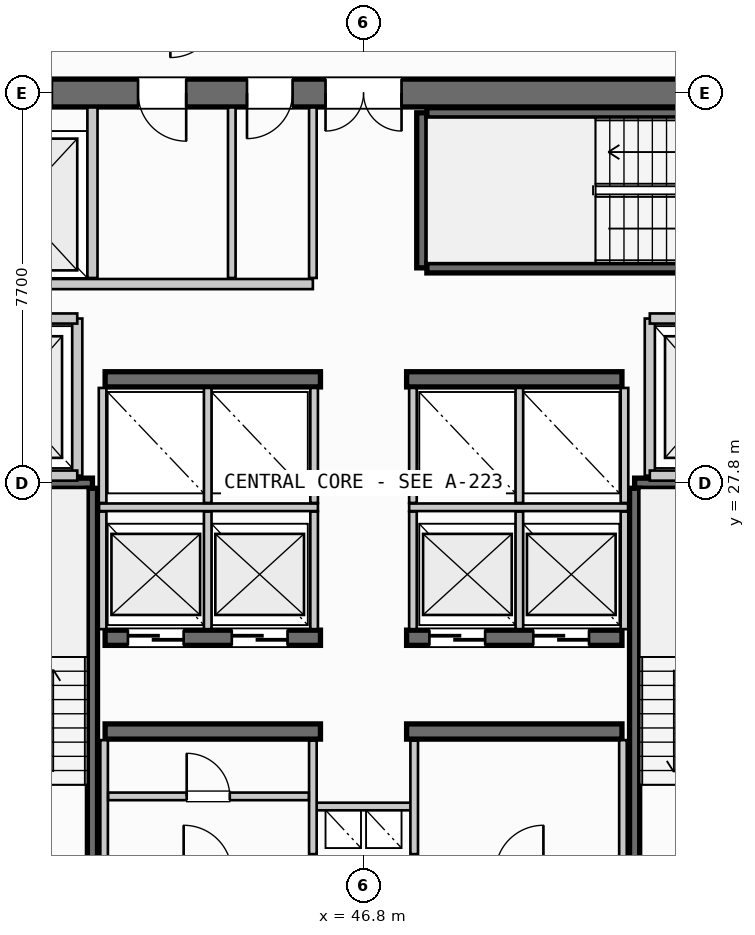
"""IFC4 building model, lengths in metres.
Left out: names, types, materials, properties, quantities, classifications, styles, units other than length and angle.
Written with IfcOpenShell. Run it as: python <this file> out.ifc"""

import sys

from ifc_helpers import new_model, si_unit, direction, frame, frame_2d, origin, place, context, subcontext, project, spatial, rectangle, extrude, source, transform, mapped, element, fill, save


model = new_model("IFC4")
c1 = context("Model", 3, precision=1e-05, world=origin(), true_north=direction((0.0, 1.0)))
c2 = subcontext(c1, "Body", "Model", "MODEL_VIEW")
j1 = project(units=[si_unit("LENGTHUNIT", "METRE"), si_unit("PLANEANGLEUNIT", "RADIAN")], contexts=[c1])
p1 = place(None, origin())
s1 = spatial("IfcSite", under=j1, at=p1, CompositionType="ELEMENT")
p2 = place(p1, origin())
s2 = spatial("IfcBuilding", under=s1, at=p2, CompositionType="ELEMENT")
p3 = place(p2, frame((0.0, 0.0, 164.3)))
s3 = spatial("IfcBuildingStorey", under=s2, at=p3, CompositionType="ELEMENT", Elevation=164.3)
p4 = place(p3, frame((55.6, 35.5, 0.0), z_axis=(0.0, 0.0, 1.0), x_axis=(-1.0, 0.0, 0.0)))
e1 = element("IfcWall", 1, at=p4, inside=s3, PredefinedType="SHEAR", context=c2, shape_type="SweptSolid", body=[
    extrude(rectangle(XDim=17.6, YDim=0.55, at=frame_2d((8.8, 0.0))), origin(), (0.0, 0.0, 1.0), 3.3),
])
p5 = place(p4, frame((8.05, 0.0, 0.0)))
e2 = element("IfcOpeningElement", 2, at=p5, cuts=e1, PredefinedType="OPENING", context=c2, shape_type="SweptSolid", body=[
    extrude(rectangle(XDim=1.5, YDim=2.2, at=frame_2d((0.75, 1.1))), frame((0.0, 0.285, 0.0), z_axis=(0.0, -1.0, 0.0), x_axis=(1.0, 0.0, 0.0)), (0.0, 0.0, 1.0), 0.57),
])
p6 = place(p4, frame((14.95, 0.0, 0.0)))
e3 = element("IfcOpeningElement", 3, at=p6, cuts=e1, PredefinedType="OPENING", context=c2, shape_type="SweptSolid", body=[
    extrude(rectangle(XDim=1.4, YDim=2.3, at=frame_2d((0.7, 1.15))), frame((0.0, 0.285, 0.0), z_axis=(0.0, -1.0, 0.0), x_axis=(1.0, 0.0, 0.0)), (0.0, 0.0, 1.0), 0.57),
])
p7 = place(p4, frame((12.3, 0.0, 0.0)))
e4 = element("IfcOpeningElement", 4, at=p7, cuts=e1, PredefinedType="OPENING", context=c2, shape_type="SweptSolid", body=[
    extrude(rectangle(XDim=0.95, YDim=2.15, at=frame_2d((0.475, 1.075))), frame((0.0, 0.285, 0.0), z_axis=(0.0, -1.0, 0.0), x_axis=(1.0, 0.0, 0.0)), (0.0, 0.0, 1.0), 0.57),
])
p8 = place(p4, frame((10.2, 0.0, 0.0)))
e5 = element("IfcOpeningElement", 5, at=p8, cuts=e1, PredefinedType="OPENING", context=c2, shape_type="SweptSolid", body=[
    extrude(rectangle(XDim=0.9, YDim=2.15, at=frame_2d((0.45, 1.075))), frame((0.0, 0.285, 0.0), z_axis=(0.0, -1.0, 0.0), x_axis=(1.0, 0.0, 0.0)), (0.0, 0.0, 1.0), 0.57),
])
for number, where, z_axis, x_axis in (
    (6, (41.7, 22.9, 0.0), (0.0, 0.0, 1.0), (1.0, 0.0, 0.0)),
    (7, (47.65, 22.9, 0.0), (0.0, 0.0, 1.0), (1.0, 0.0, 0.0)),
):
    element("IfcWall", number, at=place(p3, frame(where, z_axis=z_axis, x_axis=x_axis)), inside=s3, PredefinedType="SHEAR", context=c2, shape_type="SweptSolid", body=[
        extrude(rectangle(XDim=4.25, YDim=0.3, at=frame_2d((2.125, 0.0))), origin(), (0.0, 0.0, 1.0), 3.3),
    ])
p9 = place(p3, frame((41.7, 24.75, 0.0), z_axis=(0.0, 0.0, 1.0), x_axis=(1.0, 0.0, 0.0)))
e8 = element("IfcWall", 8, at=p9, inside=s3, PredefinedType="SHEAR", context=c2, shape_type="SweptSolid", body=[
    extrude(rectangle(XDim=4.25, YDim=0.3, at=frame_2d((2.125, 0.0))), origin(), (0.0, 0.0, 1.0), 3.3),
])
p10 = place(p9, frame((0.45, 0.0, 0.0)))
e9 = element("IfcOpeningElement", 9, at=p10, cuts=e8, PredefinedType="OPENING", context=c2, shape_type="SweptSolid", body=[
    extrude(rectangle(XDim=1.1, YDim=2.2, at=frame_2d((0.55, 1.1))), frame((0.0, 0.16, 0.0), z_axis=(0.0, -1.0, 0.0), x_axis=(1.0, 0.0, 0.0)), (0.0, 0.0, 1.0), 0.32),
])
p11 = place(p9, frame((2.5, 0.0, 0.0)))
e10 = element("IfcOpeningElement", 10, at=p11, cuts=e8, PredefinedType="OPENING", context=c2, shape_type="SweptSolid", body=[
    extrude(rectangle(XDim=1.1, YDim=2.2, at=frame_2d((0.55, 1.1))), frame((0.0, 0.16, 0.0), z_axis=(0.0, -1.0, 0.0), x_axis=(1.0, 0.0, 0.0)), (0.0, 0.0, 1.0), 0.32),
])
p12 = place(p3, frame((47.65, 24.75, 0.0), z_axis=(0.0, 0.0, 1.0), x_axis=(1.0, 0.0, 0.0)))
e11 = element("IfcWall", 11, at=p12, inside=s3, PredefinedType="SHEAR", context=c2, shape_type="SweptSolid", body=[
    extrude(rectangle(XDim=4.25, YDim=0.3, at=frame_2d((2.125, 0.0))), origin(), (0.0, 0.0, 1.0), 3.3),
])
p13 = place(p12, frame((0.45, 0.0, 0.0)))
e12 = element("IfcOpeningElement", 12, at=p13, cuts=e11, PredefinedType="OPENING", context=c2, shape_type="SweptSolid", body=[
    extrude(rectangle(XDim=1.1, YDim=2.2, at=frame_2d((0.55, 1.1))), frame((0.0, 0.16, 0.0), z_axis=(0.0, -1.0, 0.0), x_axis=(1.0, 0.0, 0.0)), (0.0, 0.0, 1.0), 0.32),
])
p14 = place(p12, frame((2.5, 0.0, 0.0)))
e13 = element("IfcOpeningElement", 13, at=p14, cuts=e11, PredefinedType="OPENING", context=c2, shape_type="SweptSolid", body=[
    extrude(rectangle(XDim=1.1, YDim=2.2, at=frame_2d((0.55, 1.1))), frame((0.0, 0.16, 0.0), z_axis=(0.0, -1.0, 0.0), x_axis=(1.0, 0.0, 0.0)), (0.0, 0.0, 1.0), 0.32),
])
for number, where, z_axis, x_axis in (
    (14, (41.7, 29.85, 0.0), (0.0, 0.0, 1.0), (1.0, 0.0, 0.0)),
    (15, (47.65, 29.85, 0.0), (0.0, 0.0, 1.0), (1.0, 0.0, 0.0)),
):
    element("IfcWall", number, at=place(p3, frame(where, z_axis=z_axis, x_axis=x_axis)), inside=s3, PredefinedType="SHEAR", context=c2, shape_type="SweptSolid", body=[
        extrude(rectangle(XDim=4.25, YDim=0.3, at=frame_2d((2.125, 0.0))), origin(), (0.0, 0.0, 1.0), 3.3),
    ])
p15 = place(p3, frame((38.39, 27.8, 0.0), z_axis=(0.0, 0.0, 1.0), x_axis=(1.0, 0.0, 0.0)))
e16 = element("IfcWall", 16, at=p15, inside=s3, PredefinedType="SHEAR", context=c2, shape_type="SweptSolid", body=[
    extrude(rectangle(XDim=3.06, YDim=0.2, at=frame_2d((1.53, 0.0))), origin(), (0.0, 0.0, 1.0), 3.3),
])
p16 = place(p3, frame((41.45, 27.7, 0.0), z_axis=(0.0, 0.0, 1.0), x_axis=(0.0, -1.0, 0.0)))
e17 = element("IfcWall", 17, at=p16, inside=s3, PredefinedType="SHEAR", context=c2, shape_type="SweptSolid", body=[
    extrude(rectangle(XDim=7.35, YDim=0.2, at=frame_2d((3.675, 0.0))), origin(), (0.0, 0.0, 1.0), 3.3),
])
p17 = place(p3, frame((52.15, 27.8, 0.0), z_axis=(0.0, 0.0, 1.0), x_axis=(1.0, 0.0, 0.0)))
e18 = element("IfcWall", 18, at=p17, inside=s3, PredefinedType="SHEAR", context=c2, shape_type="SweptSolid", body=[
    extrude(rectangle(XDim=3.06, YDim=0.2, at=frame_2d((1.53, 0.0))), origin(), (0.0, 0.0, 1.0), 3.3),
])
p18 = place(p3, frame((52.15, 20.35, 0.0), z_axis=(0.0, 0.0, 1.0), x_axis=(0.0, 1.0, 0.0)))
e19 = element("IfcWall", 19, at=p18, inside=s3, PredefinedType="SHEAR", context=c2, shape_type="SweptSolid", body=[
    extrude(rectangle(XDim=7.35, YDim=0.2, at=frame_2d((3.675, 0.0))), origin(), (0.0, 0.0, 1.0), 3.3),
])
p19 = place(p3, frame((47.95, 32.05, 0.0), z_axis=(0.0, 0.0, 1.0), x_axis=(0.0, 1.0, 0.0)))
e20 = element("IfcWall", 20, at=p19, inside=s3, PredefinedType="SHEAR", context=c2, shape_type="SweptSolid", body=[
    extrude(rectangle(XDim=3.06, YDim=0.2, at=frame_2d((1.53, 0.0))), origin(), (0.0, 0.0, 1.0), 3.3),
])
for number, where, z_axis, x_axis in (
    (21, (48.05, 35.11, 0.0), (0.0, 0.0, 1.0), (1.0, 0.0, 0.0)),
    (22, (55.4, 32.05, 0.0), (0.0, 0.0, 1.0), (-1.0, 0.0, 0.0)),
):
    element("IfcWall", number, at=place(p3, frame(where, z_axis=z_axis, x_axis=x_axis)), inside=s3, PredefinedType="SHEAR", context=c2, shape_type="SweptSolid", body=[
        extrude(rectangle(XDim=7.35, YDim=0.2, at=frame_2d((3.675, 0.0))), origin(), (0.0, 0.0, 1.0), 3.3),
    ])
p20 = place(p3, frame((45.8, 21.42, 0.0), z_axis=(0.0, 0.0, 1.0), x_axis=(1.0, 0.0, 0.0)))
e23 = element("IfcWall", 23, at=p20, inside=s3, PredefinedType="PARTITIONING", context=c2, shape_type="SweptSolid", body=[
    extrude(rectangle(XDim=2.0, YDim=0.15, at=frame_2d((1.0, 0.0))), origin(), (0.0, 0.0, 1.0), 2.28),
])
for number, where, z_axis, x_axis in (
    (24, (45.8, 20.48, 0.0), (0.0, 0.0, 1.0), (0.0, 1.0, 0.0)),
    (25, (47.8, 20.48, 0.0), (0.0, 0.0, 1.0), (0.0, 1.0, 0.0)),
):
    element("IfcWall", number, at=place(p3, frame(where, z_axis=z_axis, x_axis=x_axis)), inside=s3, PredefinedType="PARTITIONING", context=c2, shape_type="SweptSolid", body=[
        extrude(rectangle(XDim=2.24, YDim=0.15, at=frame_2d((1.12, 0.0))), origin(), (0.0, 0.0, 1.0), 2.28),
    ])
p21 = place(p3, frame((41.15, 27.95, 0.0), z_axis=(0.0, 0.0, 1.0), x_axis=(0.0, 1.0, 0.0)))
e26 = element("IfcWall", 26, at=p21, inside=s3, PredefinedType="PARTITIONING", context=c2, shape_type="SweptSolid", body=[
    extrude(rectangle(XDim=3.1, YDim=0.2, at=frame_2d((1.55, 0.0))), origin(), (0.0, 0.0, 1.0), 2.28),
])
for number, where, z_axis, x_axis in (
    (27, (38.285, 27.95, 0.0), (0.0, 0.0, 1.0), (1.0, 0.0, 0.0)),
    (28, (38.285, 31.05, 0.0), (0.0, 0.0, 1.0), (1.0, 0.0, 0.0)),
):
    element("IfcWall", number, at=place(p3, frame(where, z_axis=z_axis, x_axis=x_axis)), inside=s3, PredefinedType="PARTITIONING", context=c2, shape_type="SweptSolid", body=[
        extrude(rectangle(XDim=2.865, YDim=0.2, at=frame_2d((1.433, 0.0))), origin(), (0.0, 0.0, 1.0), 2.28),
    ])
p22 = place(p3, frame((52.45, 27.95, 0.0), z_axis=(0.0, 0.0, 1.0), x_axis=(0.0, 1.0, 0.0)))
e29 = element("IfcWall", 29, at=p22, inside=s3, PredefinedType="PARTITIONING", context=c2, shape_type="SweptSolid", body=[
    extrude(rectangle(XDim=3.1, YDim=0.2, at=frame_2d((1.55, 0.0))), origin(), (0.0, 0.0, 1.0), 2.28),
])
for number, where, z_axis, x_axis in (
    (30, (52.45, 27.95, 0.0), (0.0, 0.0, 1.0), (1.0, 0.0, 0.0)),
    (31, (52.45, 31.05, 0.0), (0.0, 0.0, 1.0), (1.0, 0.0, 0.0)),
):
    element("IfcWall", number, at=place(p3, frame(where, z_axis=z_axis, x_axis=x_axis)), inside=s3, PredefinedType="PARTITIONING", context=c2, shape_type="SweptSolid", body=[
        extrude(rectangle(XDim=2.865, YDim=0.2, at=frame_2d((1.433, 0.0))), origin(), (0.0, 0.0, 1.0), 2.28),
    ])
for number, where, z_axis, x_axis in (
    (32, (41.68, 20.385, 0.0), (0.0, 0.0, 1.0), (0.0, 1.0, 0.0)),
    (33, (51.92, 20.385, 0.0), (0.0, 0.0, 1.0), (0.0, 1.0, 0.0)),
):
    element("IfcWall", number, at=place(p3, frame(where, z_axis=z_axis, x_axis=x_axis)), inside=s3, PredefinedType="PARTITIONING", context=c2, shape_type="SweptSolid", body=[
        extrude(rectangle(XDim=2.345, YDim=0.15, at=frame_2d((1.172, 0.0))), origin(), (0.0, 0.0, 1.0), 2.28),
    ])
p23 = place(p3, frame((41.76, 21.62, 0.0), z_axis=(0.0, 0.0, 1.0), x_axis=(1.0, 0.0, 0.0)))
e34 = element("IfcWall", 34, at=p23, inside=s3, PredefinedType="PARTITIONING", context=c2, shape_type="SweptSolid", body=[
    extrude(rectangle(XDim=3.96, YDim=0.15, at=frame_2d((1.98, 0.0))), origin(), (0.0, 0.0, 1.0), 2.28),
])
p24 = place(p23, frame((1.55, 0.0, 0.0)))
e35 = element("IfcOpeningElement", 35, at=p24, cuts=e34, PredefinedType="OPENING", context=c2, shape_type="SweptSolid", body=[
    extrude(rectangle(XDim=0.85, YDim=2.15, at=frame_2d((0.425, 1.075))), frame((0.0, 0.085, 0.0), z_axis=(0.0, -1.0, 0.0), x_axis=(1.0, 0.0, 0.0)), (0.0, 0.0, 1.0), 0.17),
])
p25 = place(p3, frame((41.58, 27.325, 0.0), z_axis=(0.0, 0.0, 1.0), x_axis=(1.0, 0.0, 0.0)))
e36 = element("IfcWall", 36, at=p25, inside=s3, PredefinedType="PARTITIONING", context=c2, shape_type="SweptSolid", body=[
    extrude(rectangle(XDim=4.32, YDim=0.15, at=frame_2d((2.16, 0.0))), origin(), (0.0, 0.0, 1.0), 2.28),
])
p26 = place(p3, frame((47.7, 27.325, 0.0), z_axis=(0.0, 0.0, 1.0), x_axis=(1.0, 0.0, 0.0)))
e37 = element("IfcWall", 37, at=p26, inside=s3, PredefinedType="PARTITIONING", context=c2, shape_type="SweptSolid", body=[
    extrude(rectangle(XDim=4.32, YDim=0.15, at=frame_2d((2.16, 0.0))), origin(), (0.0, 0.0, 1.0), 2.28),
])
for number, where, z_axis, x_axis in (
    (38, (41.65, 24.92, 0.0), (0.0, 0.0, 1.0), (0.0, 1.0, 0.0)),
    (39, (43.725, 24.92, 0.0), (0.0, 0.0, 1.0), (0.0, 1.0, 0.0)),
    (40, (45.825, 24.92, 0.0), (0.0, 0.0, 1.0), (0.0, 1.0, 0.0)),
    (41, (47.775, 24.92, 0.0), (0.0, 0.0, 1.0), (0.0, 1.0, 0.0)),
    (42, (49.875, 24.92, 0.0), (0.0, 0.0, 1.0), (0.0, 1.0, 0.0)),
    (43, (51.95, 24.92, 0.0), (0.0, 0.0, 1.0), (0.0, 1.0, 0.0)),
):
    element("IfcWall", number, at=place(p3, frame(where, z_axis=z_axis, x_axis=x_axis)), inside=s3, PredefinedType="PARTITIONING", context=c2, shape_type="SweptSolid", body=[
        extrude(rectangle(XDim=2.32, YDim=0.15, at=frame_2d((1.16, 0.0))), origin(), (0.0, 0.0, 1.0), 2.28),
    ])
for number, where, z_axis, x_axis in (
    (44, (41.65, 27.41, 0.0), (0.0, 0.0, 1.0), (0.0, 1.0, 0.0)),
    (45, (43.725, 27.41, 0.0), (0.0, 0.0, 1.0), (0.0, 1.0, 0.0)),
    (46, (45.825, 27.41, 0.0), (0.0, 0.0, 1.0), (0.0, 1.0, 0.0)),
    (47, (47.775, 27.41, 0.0), (0.0, 0.0, 1.0), (0.0, 1.0, 0.0)),
    (48, (49.875, 27.41, 0.0), (0.0, 0.0, 1.0), (0.0, 1.0, 0.0)),
    (49, (51.95, 27.41, 0.0), (0.0, 0.0, 1.0), (0.0, 1.0, 0.0)),
):
    element("IfcWall", number, at=place(p3, frame(where, z_axis=z_axis, x_axis=x_axis)), inside=s3, PredefinedType="PARTITIONING", context=c2, shape_type="SweptSolid", body=[
        extrude(rectangle(XDim=2.27, YDim=0.15, at=frame_2d((1.135, 0.0))), origin(), (0.0, 0.0, 1.0), 2.28),
    ])
p27 = place(p3, frame((41.45, 31.85, 0.0), z_axis=(0.0, 0.0, 1.0), x_axis=(0.0, 1.0, 0.0)))
e50 = element("IfcWall", 50, at=p27, inside=s3, PredefinedType="PARTITIONING", context=c2, shape_type="SweptSolid", body=[
    extrude(rectangle(XDim=3.365, YDim=0.2, at=frame_2d((1.683, 0.0))), origin(), (0.0, 0.0, 1.0), 2.28),
])
p28 = place(p3, frame((38.285, 31.73, 0.0), z_axis=(0.0, 0.0, 1.0), x_axis=(1.0, 0.0, 0.0)))
e51 = element("IfcWall", 51, at=p28, inside=s3, PredefinedType="PARTITIONING", context=c2, shape_type="SweptSolid", body=[
    extrude(rectangle(XDim=7.515, YDim=0.2, at=frame_2d((3.758, 0.0))), origin(), (0.0, 0.0, 1.0), 2.28),
])
p29 = place(p3, frame((45.8, 31.85, 0.0), z_axis=(0.0, 0.0, 1.0), x_axis=(0.0, 1.0, 0.0)))
e52 = element("IfcWall", 52, at=p29, inside=s3, PredefinedType="PARTITIONING", context=c2, shape_type="SweptSolid", body=[
    extrude(rectangle(XDim=3.365, YDim=0.15, at=frame_2d((1.683, 0.0))), origin(), (0.0, 0.0, 1.0), 2.28),
])
p30 = place(p3, frame((44.2, 31.85, 0.0), z_axis=(0.0, 0.0, 1.0), x_axis=(0.0, 1.0, 0.0)))
e53 = element("IfcWall", 53, at=p30, inside=s3, PredefinedType="PLUMBINGWALL", context=c2, shape_type="SweptSolid", body=[
    extrude(rectangle(XDim=3.365, YDim=0.15, at=frame_2d((1.683, 0.0))), origin(), (0.0, 0.0, 1.0), 2.28),
])
m1 = source(origin(), c2, "Body", "SweptSolid", [
    extrude(rectangle(XDim=1.5, YDim=2.2, at=frame_2d((0.75, 1.1))), frame((0.0, 0.025, 0.0), z_axis=(0.0, -1.0, 0.0), x_axis=(1.0, 0.0, 0.0)), (0.0, 0.0, 1.0), 0.05),
])
p31 = place(p5, origin())
e54 = element("IfcDoor", 54, at=p31, inside=s3, OperationType="DOUBLE_DOOR_SINGLE_SWING", PredefinedType="DOOR", context=c2, shape_type="MappedRepresentation", body=[
    mapped(m1, transform((0.0, 0.0, 0.0), scale=1.0)),
])
fill(e2, e54)
m2 = source(origin(), c2, "Body", "SweptSolid", [
    extrude(rectangle(XDim=1.1, YDim=2.2, at=frame_2d((0.55, 1.1))), frame((0.0, 0.025, 0.0), z_axis=(0.0, -1.0, 0.0), x_axis=(1.0, 0.0, 0.0)), (0.0, 0.0, 1.0), 0.05),
])
p32 = place(p10, origin())
e55 = element("IfcDoor", 55, at=p32, inside=s3, OperationType="SLIDING_TO_RIGHT", PredefinedType="DOOR", context=c2, shape_type="MappedRepresentation", body=[
    mapped(m2, transform((0.0, 0.0, 0.0), scale=1.0)),
])
fill(e9, e55)
p33 = place(p11, origin())
e56 = element("IfcDoor", 56, at=p33, inside=s3, OperationType="SLIDING_TO_RIGHT", PredefinedType="DOOR", context=c2, shape_type="MappedRepresentation", body=[
    mapped(m2, transform((0.0, 0.0, 0.0), scale=1.0)),
])
fill(e10, e56)
p34 = place(p13, origin())
e57 = element("IfcDoor", 57, at=p34, inside=s3, OperationType="SLIDING_TO_RIGHT", PredefinedType="DOOR", context=c2, shape_type="MappedRepresentation", body=[
    mapped(m2, transform((0.0, 0.0, 0.0), scale=1.0)),
])
fill(e12, e57)
p35 = place(p14, origin())
e58 = element("IfcDoor", 58, at=p35, inside=s3, OperationType="SLIDING_TO_RIGHT", PredefinedType="DOOR", context=c2, shape_type="MappedRepresentation", body=[
    mapped(m2, transform((0.0, 0.0, 0.0), scale=1.0)),
])
fill(e13, e58)
m3 = source(origin(), c2, "Body", "SweptSolid", [
    extrude(rectangle(XDim=1.4, YDim=2.3, at=frame_2d((0.7, 1.15))), frame((0.0, 0.025, 0.0), z_axis=(0.0, -1.0, 0.0), x_axis=(1.0, 0.0, 0.0)), (0.0, 0.0, 1.0), 0.05),
])
p36 = place(p6, origin())
e59 = element("IfcDoor", 59, at=p36, inside=s3, OperationType="SLIDING_TO_RIGHT", PredefinedType="DOOR", context=c2, shape_type="MappedRepresentation", body=[
    mapped(m3, transform((0.0, 0.0, 0.0), scale=1.0)),
])
fill(e3, e59)
m4 = source(origin(), c2, "Body", "SweptSolid", [
    extrude(rectangle(XDim=0.95, YDim=2.15, at=frame_2d((0.475, 1.075))), frame((0.0, 0.025, 0.0), z_axis=(0.0, -1.0, 0.0), x_axis=(1.0, 0.0, 0.0)), (0.0, 0.0, 1.0), 0.05),
])
p37 = place(p7, origin())
e60 = element("IfcDoor", 60, at=p37, inside=s3, OperationType="SINGLE_SWING_LEFT", PredefinedType="DOOR", context=c2, shape_type="MappedRepresentation", body=[
    mapped(m4, transform((0.0, 0.0, 0.0), scale=1.0)),
])
fill(e4, e60)
m5 = source(origin(), c2, "Body", "SweptSolid", [
    extrude(rectangle(XDim=0.9, YDim=2.15, at=frame_2d((0.45, 1.075))), frame((0.0, 0.025, 0.0), z_axis=(0.0, -1.0, 0.0), x_axis=(1.0, 0.0, 0.0)), (0.0, 0.0, 1.0), 0.05),
])
p38 = place(p8, origin())
e61 = element("IfcDoor", 61, at=p38, inside=s3, OperationType="SINGLE_SWING_RIGHT", PredefinedType="DOOR", context=c2, shape_type="MappedRepresentation", body=[
    mapped(m5, transform((0.0, 0.0, 0.0), scale=1.0)),
])
fill(e5, e61)
m6 = source(origin(), c2, "Body", "SweptSolid", [
    extrude(rectangle(XDim=0.85, YDim=2.15, at=frame_2d((0.425, 1.075))), frame((0.0, 0.025, 0.0), z_axis=(0.0, -1.0, 0.0), x_axis=(1.0, 0.0, 0.0)), (0.0, 0.0, 1.0), 0.05),
])
p39 = place(p24, origin())
e62 = element("IfcDoor", 62, at=p39, inside=s3, OperationType="SINGLE_SWING_LEFT", PredefinedType="DOOR", context=c2, shape_type="MappedRepresentation", body=[
    mapped(m6, transform((0.0, 0.0, 0.0), scale=1.0)),
])
fill(e35, e62)
save(model, sys.argv[1])
